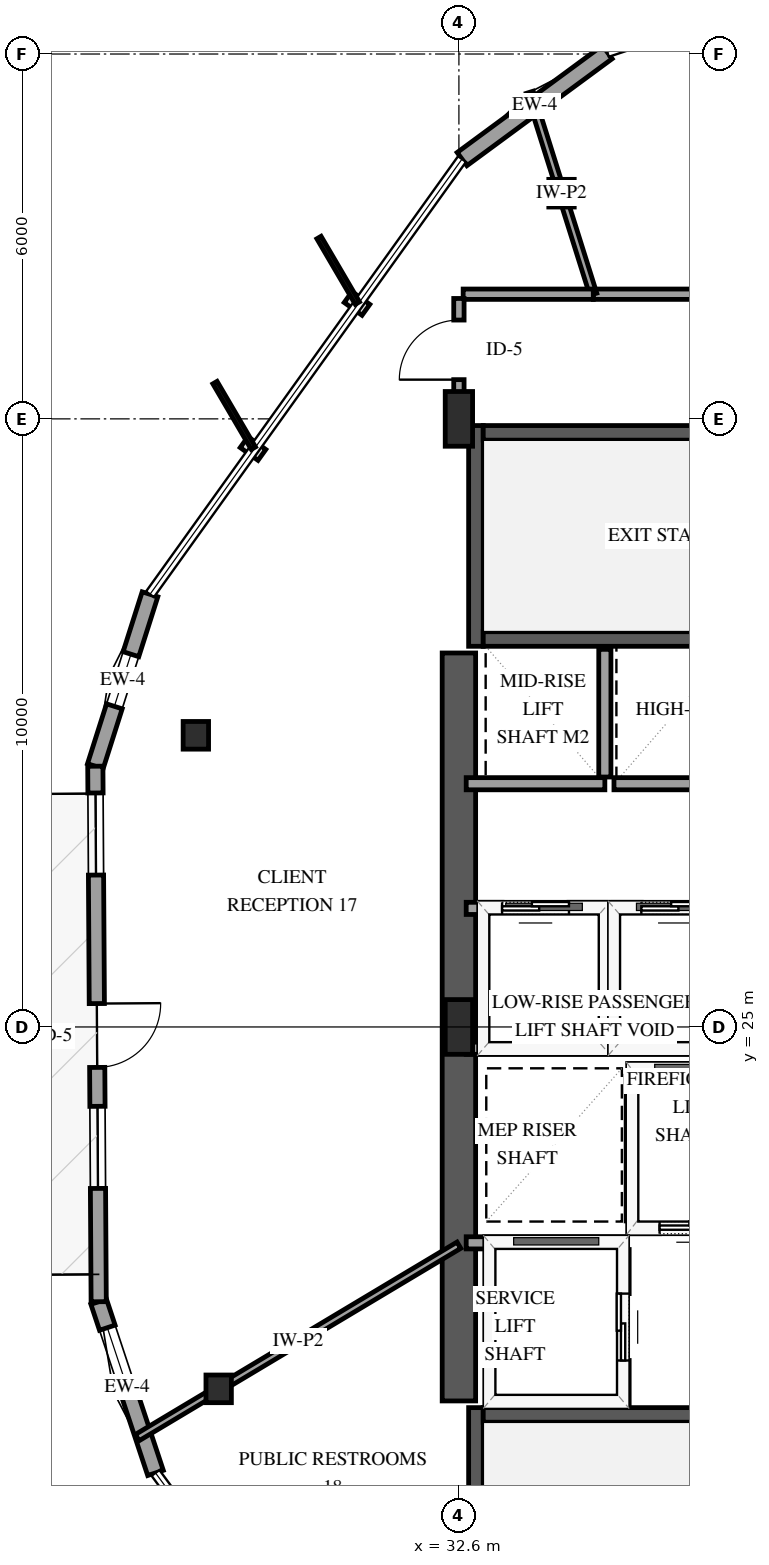
"""IFC4 building model, lengths in metres.
Left out: names, types, materials, properties, quantities, classifications, styles, units other than length and angle.
Written with IfcOpenShell. Run it as: python <this file> out.ifc"""

import sys

from ifc_helpers import new_model, si_unit, direction, frame, frame_2d, origin, origin_2d, place, context, subcontext, project, spatial, rectangle, i_section, extrude, element, fill, save


model = new_model("IFC4")
c1 = context("Model", 3, precision=1e-05, world=origin(), true_north=direction((0.0, 1.0)))
c2 = subcontext(c1, "Body", "Model", "MODEL_VIEW")
j1 = project(units=[si_unit("LENGTHUNIT", "METRE"), si_unit("PLANEANGLEUNIT", "RADIAN")], contexts=[c1])
p1 = place(None, origin())
s1 = spatial("IfcSite", under=j1, at=p1, CompositionType="ELEMENT")
p2 = place(p1, origin())
s2 = spatial("IfcBuilding", under=s1, at=p2, CompositionType="ELEMENT")
p3 = place(p2, frame((0.0, 0.0, 99.1)))
s3 = spatial("IfcBuildingStorey", under=s2, at=p3, CompositionType="ELEMENT", Elevation=99.1)
p4 = place(p3, frame((32.88, 15.11, 0.0), z_axis=(0.0, 0.0, 1.0), x_axis=(0.0, 1.0, 0.0)))
e1 = element("IfcWall", 1, at=p4, inside=s3, PredefinedType="SHEAR", context=c2, shape_type="SweptSolid", body=[
    extrude(rectangle(XDim=3.63, YDim=0.24, at=frame_2d((1.815, 0.0))), origin(), (0.0, 0.0, 1.0), 3.9),
])
p5 = place(p3, frame((33.0, 18.62, 0.0), z_axis=(0.0, 0.0, 1.0), x_axis=(1.0, 0.0, 0.0)))
e2 = element("IfcWall", 2, at=p5, inside=s3, PredefinedType="SHEAR", context=c2, shape_type="SweptSolid", body=[
    extrude(rectangle(XDim=8.0, YDim=0.24, at=frame_2d((4.0, 0.0))), origin(), (0.0, 0.0, 1.0), 3.9),
])
p6 = place(p3, frame((32.88, 31.26, 0.0), z_axis=(0.0, 0.0, 1.0), x_axis=(0.0, 1.0, 0.0)))
e3 = element("IfcWall", 3, at=p6, inside=s3, PredefinedType="SHEAR", context=c2, shape_type="SweptSolid", body=[
    extrude(rectangle(XDim=3.63, YDim=0.24, at=frame_2d((1.815, 0.0))), origin(), (0.0, 0.0, 1.0), 3.9),
])
for number, where, z_axis, x_axis in (
    (4, (33.0, 31.38, 0.0), (0.0, 0.0, 1.0), (1.0, 0.0, 0.0)),
    (5, (33.0, 34.77, 0.0), (0.0, 0.0, 1.0), (1.0, 0.0, 0.0)),
):
    element("IfcWall", number, at=place(p3, frame(where, z_axis=z_axis, x_axis=x_axis)), inside=s3, PredefinedType="SHEAR", context=c2, shape_type="SweptSolid", body=[
        extrude(rectangle(XDim=8.0, YDim=0.24, at=frame_2d((4.0, 0.0))), origin(), (0.0, 0.0, 1.0), 3.9),
    ])
p7 = place(p3, frame((32.6, 18.85, 0.0), z_axis=(0.0, 0.0, 1.0), x_axis=(0.0, 1.0, 0.0)))
e6 = element("IfcWall", 6, at=p7, inside=s3, PredefinedType="SHEAR", context=c2, shape_type="SweptSolid", body=[
    extrude(rectangle(XDim=12.3, YDim=0.55, at=frame_2d((6.15, 0.0))), origin(), (0.0, 0.0, 1.0), 3.9),
])
for number, where, z_axis, x_axis in (
    (7, (32.6, 25.0, 0.0), (0.0, 0.0, 1.0), (1.0, 0.0, 0.0)),
    (8, (32.6, 35.0, 0.0), (0.0, 0.0, 1.0), (1.0, 0.0, 0.0)),
):
    element("IfcColumn", number, at=place(p3, frame(where, z_axis=z_axis, x_axis=x_axis)), inside=s3, PredefinedType="PILASTER", context=c2, shape_type="SweptSolid", body=[
        extrude(rectangle(XDim=0.45, YDim=0.9, at=origin_2d()), origin(), (0.0, 0.0, 1.0), 3.9),
    ])
for number, where, z_axis, x_axis in (
    (9, (34.288, 38.711, 0.0), (0.0, 0.0, 1.0), (1.0, 0.0, 0.0)),
    (10, (28.274, 29.796, 0.0), (0.0, 0.0, 1.0), (1.0, 0.0, 0.0)),
    (11, (28.649, 19.049, 0.0), (0.0, 0.0, 1.0), (1.0, 0.0, 0.0)),
):
    element("IfcColumn", number, at=place(p3, frame(where, z_axis=z_axis, x_axis=x_axis)), inside=s3, PredefinedType="COLUMN", context=c2, shape_type="SweptSolid", body=[
        extrude(i_section(OverallWidth=0.418, OverallDepth=0.455, WebThickness=0.042, FlangeThickness=0.068, FilletRadius=0.038, at=origin_2d()), origin(), (0.0, 0.0, 1.0), 3.9),
    ])
p8 = place(p3, frame((35.04, 41.031, 0.0), z_axis=(0.0, 0.0, 1.0), x_axis=(-0.80529158798, -0.592878957569, 0.0)))
e12 = element("IfcWall", 12, at=p8, inside=s3, PredefinedType="SOLIDWALL", context=c2, shape_type="SweptSolid", body=[
    extrude(rectangle(XDim=2.967, YDim=0.27, at=frame_2d((1.483, 0.0))), origin(), (0.0, 0.0, 1.0), 2.979),
])
p9 = place(p3, frame((27.52, 32.115, 0.0), z_axis=(0.0, 0.0, 1.0), x_axis=(-0.303013428865, -0.952986286327, 0.0)))
e13 = element("IfcWall", 13, at=p9, inside=s3, PredefinedType="SOLIDWALL", context=c2, shape_type="SweptSolid", body=[
    extrude(rectangle(XDim=2.967, YDim=0.27, at=frame_2d((1.483, 0.0))), origin(), (0.0, 0.0, 1.0), 2.979),
])
p10 = place(p9, frame((1.033, 0.0, 0.75)))
e14 = element("IfcOpeningElement", 14, at=p10, cuts=e13, PredefinedType="OPENING", context=c2, shape_type="SweptSolid", body=[
    extrude(rectangle(XDim=0.9, YDim=1.5, at=frame_2d((0.45, 0.75))), frame((0.0, 0.145, 0.0), z_axis=(0.0, -1.0, 0.0), x_axis=(1.0, 0.0, 0.0)), (0.0, 0.0, 1.0), 0.29),
])
p11 = place(p3, frame((26.676, 20.481, 0.0), z_axis=(0.0, 0.0, 1.0), x_axis=(0.314968272773, -0.94910220058, 0.0)))
e15 = element("IfcWall", 15, at=p11, inside=s3, PredefinedType="SOLIDWALL", context=c2, shape_type="SweptSolid", body=[
    extrude(rectangle(XDim=2.966, YDim=0.27, at=frame_2d((1.483, 0.0))), origin(), (0.0, 0.0, 1.0), 2.979),
])
p12 = place(p11, frame((0.45, 0.0, 0.75)))
e16 = element("IfcOpeningElement", 16, at=p12, cuts=e15, PredefinedType="OPENING", context=c2, shape_type="SweptSolid", body=[
    extrude(rectangle(XDim=0.9, YDim=1.5, at=frame_2d((0.45, 0.75))), frame((0.0, 0.145, 0.0), z_axis=(0.0, -1.0, 0.0), x_axis=(1.0, 0.0, 0.0)), (0.0, 0.0, 1.0), 0.29),
])
p13 = place(p3, frame((26.621, 29.288, 0.0), z_axis=(0.0, 0.0, 1.0), x_axis=(0.006293019465, -0.999980198757, 0.0)))
e17 = element("IfcWall", 17, at=p13, inside=s3, PredefinedType="SOLIDWALL", context=c2, shape_type="SweptSolid", body=[
    extrude(rectangle(XDim=8.807, YDim=0.25, at=frame_2d((4.403, 0.0))), origin(), (0.0, 0.0, 1.0), 2.979),
])
p14 = place(p13, frame((3.903, 0.0, 0.0)))
e18 = element("IfcOpeningElement", 18, at=p14, cuts=e17, PredefinedType="OPENING", context=c2, shape_type="SweptSolid", body=[
    extrude(rectangle(XDim=1.05, YDim=2.15, at=frame_2d((0.525, 1.075))), frame((0.0, 0.135, 0.0), z_axis=(0.0, -1.0, 0.0), x_axis=(1.0, 0.0, 0.0)), (0.0, 0.0, 1.0), 0.27),
])
p15 = place(p13, frame((0.44, 0.0, 0.72)))
e19 = element("IfcOpeningElement", 19, at=p15, cuts=e17, PredefinedType="OPENING", context=c2, shape_type="SweptSolid", body=[
    extrude(rectangle(XDim=1.35, YDim=1.65, at=frame_2d((0.675, 0.825))), frame((0.0, 0.135, 0.0), z_axis=(0.0, -1.0, 0.0), x_axis=(1.0, 0.0, 0.0)), (0.0, 0.0, 1.0), 0.27),
])
p16 = place(p13, frame((5.593, 0.0, 0.72)))
e20 = element("IfcOpeningElement", 20, at=p16, cuts=e17, PredefinedType="OPENING", context=c2, shape_type="SweptSolid", body=[
    extrude(rectangle(XDim=1.35, YDim=1.65, at=frame_2d((0.675, 0.825))), frame((0.0, 0.135, 0.0), z_axis=(0.0, -1.0, 0.0), x_axis=(1.0, 0.0, 0.0)), (0.0, 0.0, 1.0), 0.27),
])
p17 = place(p3, frame((35.45, 21.7, 0.0), z_axis=(0.0, 0.0, 1.0), x_axis=(1.0, 0.0, 0.0)))
e21 = element("IfcWall", 21, at=p17, inside=s3, PredefinedType="SOLIDWALL", context=c2, shape_type="SweptSolid", body=[
    extrude(rectangle(XDim=2.0, YDim=0.2, at=frame_2d((1.0, 0.0))), origin(), (0.0, 0.0, 1.0), 3.6),
])
p18 = place(p17, frame((0.45, 0.0, 0.0)))
e22 = element("IfcOpeningElement", 22, at=p18, cuts=e21, PredefinedType="OPENING", context=c2, shape_type="SweptSolid", body=[
    extrude(rectangle(XDim=1.1, YDim=2.15, at=frame_2d((0.55, 1.075))), frame((0.0, 0.11, 0.0), z_axis=(0.0, -1.0, 0.0), x_axis=(1.0, 0.0, 0.0)), (0.0, 0.0, 1.0), 0.22),
])
p19 = place(p3, frame((35.45, 24.3, 0.0), z_axis=(0.0, 0.0, 1.0), x_axis=(1.0, 0.0, 0.0)))
e23 = element("IfcWall", 23, at=p19, inside=s3, PredefinedType="SOLIDWALL", context=c2, shape_type="SweptSolid", body=[
    extrude(rectangle(XDim=2.0, YDim=0.2, at=frame_2d((1.0, 0.0))), origin(), (0.0, 0.0, 1.0), 3.6),
])
p20 = place(p3, frame((35.45, 21.81, 0.0), z_axis=(0.0, 0.0, 1.0), x_axis=(0.0, 1.0, 0.0)))
e24 = element("IfcWall", 24, at=p20, inside=s3, PredefinedType="SOLIDWALL", context=c2, shape_type="SweptSolid", body=[
    extrude(rectangle(XDim=2.38, YDim=0.2, at=frame_2d((1.19, 0.0))), origin(), (0.0, 0.0, 1.0), 3.6),
])
p21 = place(p3, frame((32.72, 21.45, 0.0), z_axis=(0.0, 0.0, 1.0), x_axis=(1.0, 0.0, 0.0)))
e25 = element("IfcWall", 25, at=p21, inside=s3, PredefinedType="SOLIDWALL", context=c2, shape_type="SweptSolid", body=[
    extrude(rectangle(XDim=2.58, YDim=0.2, at=frame_2d((1.29, 0.0))), origin(), (0.0, 0.0, 1.0), 3.6),
])
p22 = place(p3, frame((35.3, 18.79, 0.0), z_axis=(0.0, 0.0, 1.0), x_axis=(0.0, 1.0, 0.0)))
e26 = element("IfcWall", 26, at=p22, inside=s3, PredefinedType="SOLIDWALL", context=c2, shape_type="SweptSolid", body=[
    extrude(rectangle(XDim=2.55, YDim=0.2, at=frame_2d((1.275, 0.0))), origin(), (0.0, 0.0, 1.0), 3.6),
])
p23 = place(p22, frame((0.725, 0.0, 0.0)))
e27 = element("IfcOpeningElement", 27, at=p23, cuts=e26, PredefinedType="OPENING", context=c2, shape_type="SweptSolid", body=[
    extrude(rectangle(XDim=1.1, YDim=2.15, at=frame_2d((0.55, 1.075))), frame((0.0, 0.11, 0.0), z_axis=(0.0, -1.0, 0.0), x_axis=(1.0, 0.0, 0.0)), (0.0, 0.0, 1.0), 0.22),
])
p24 = place(p3, frame((32.72, 24.65, 0.0), z_axis=(0.0, 0.0, 1.0), x_axis=(1.0, 0.0, 0.0)))
e28 = element("IfcWall", 28, at=p24, inside=s3, PredefinedType="SOLIDWALL", context=c2, shape_type="SweptSolid", body=[
    extrude(rectangle(XDim=2.28, YDim=0.2, at=frame_2d((1.14, 0.0))), origin(), (0.0, 0.0, 1.0), 3.6),
])
p25 = place(p3, frame((32.72, 26.95, 0.0), z_axis=(0.0, 0.0, 1.0), x_axis=(1.0, 0.0, 0.0)))
e29 = element("IfcWall", 29, at=p25, inside=s3, PredefinedType="SOLIDWALL", context=c2, shape_type="SweptSolid", body=[
    extrude(rectangle(XDim=2.28, YDim=0.2, at=frame_2d((1.14, 0.0))), origin(), (0.0, 0.0, 1.0), 3.6),
])
p26 = place(p25, frame((0.59, 0.0, 0.0)))
e30 = element("IfcOpeningElement", 30, at=p26, cuts=e29, PredefinedType="OPENING", context=c2, shape_type="SweptSolid", body=[
    extrude(rectangle(XDim=1.1, YDim=2.15, at=frame_2d((0.55, 1.075))), frame((0.0, 0.11, 0.0), z_axis=(0.0, -1.0, 0.0), x_axis=(1.0, 0.0, 0.0)), (0.0, 0.0, 1.0), 0.22),
])
p27 = place(p3, frame((35.0, 24.76, 0.0), z_axis=(0.0, 0.0, 1.0), x_axis=(0.0, 1.0, 0.0)))
e31 = element("IfcWall", 31, at=p27, inside=s3, PredefinedType="SOLIDWALL", context=c2, shape_type="SweptSolid", body=[
    extrude(rectangle(XDim=2.08, YDim=0.2, at=frame_2d((1.04, 0.0))), origin(), (0.0, 0.0, 1.0), 3.6),
])
p28 = place(p3, frame((35.15, 24.65, 0.0), z_axis=(0.0, 0.0, 1.0), x_axis=(1.0, 0.0, 0.0)))
e32 = element("IfcWall", 32, at=p28, inside=s3, PredefinedType="SOLIDWALL", context=c2, shape_type="SweptSolid", body=[
    extrude(rectangle(XDim=2.0, YDim=0.2, at=frame_2d((1.0, 0.0))), origin(), (0.0, 0.0, 1.0), 3.6),
])
p29 = place(p3, frame((35.15, 26.95, 0.0), z_axis=(0.0, 0.0, 1.0), x_axis=(1.0, 0.0, 0.0)))
e33 = element("IfcWall", 33, at=p29, inside=s3, PredefinedType="SOLIDWALL", context=c2, shape_type="SweptSolid", body=[
    extrude(rectangle(XDim=2.0, YDim=0.2, at=frame_2d((1.0, 0.0))), origin(), (0.0, 0.0, 1.0), 3.6),
])
p30 = place(p29, frame((0.45, 0.0, 0.0)))
e34 = element("IfcOpeningElement", 34, at=p30, cuts=e33, PredefinedType="OPENING", context=c2, shape_type="SweptSolid", body=[
    extrude(rectangle(XDim=1.1, YDim=2.15, at=frame_2d((0.55, 1.075))), frame((0.0, 0.11, 0.0), z_axis=(0.0, -1.0, 0.0), x_axis=(1.0, 0.0, 0.0)), (0.0, 0.0, 1.0), 0.22),
])
p31 = place(p3, frame((32.72, 29.0, 0.0), z_axis=(0.0, 0.0, 1.0), x_axis=(1.0, 0.0, 0.0)))
e35 = element("IfcWall", 35, at=p31, inside=s3, PredefinedType="SOLIDWALL", context=c2, shape_type="SweptSolid", body=[
    extrude(rectangle(XDim=2.28, YDim=0.2, at=frame_2d((1.14, 0.0))), origin(), (0.0, 0.0, 1.0), 3.6),
])
p32 = place(p3, frame((35.0, 29.11, 0.0), z_axis=(0.0, 0.0, 1.0), x_axis=(0.0, 1.0, 0.0)))
e36 = element("IfcWall", 36, at=p32, inside=s3, PredefinedType="SOLIDWALL", context=c2, shape_type="SweptSolid", body=[
    extrude(rectangle(XDim=2.1, YDim=0.2, at=frame_2d((1.05, 0.0))), origin(), (0.0, 0.0, 1.0), 3.6),
])
p33 = place(p3, frame((35.15, 29.0, 0.0), z_axis=(0.0, 0.0, 1.0), x_axis=(1.0, 0.0, 0.0)))
e37 = element("IfcWall", 37, at=p33, inside=s3, PredefinedType="SOLIDWALL", context=c2, shape_type="SweptSolid", body=[
    extrude(rectangle(XDim=2.0, YDim=0.2, at=frame_2d((1.0, 0.0))), origin(), (0.0, 0.0, 1.0), 3.6),
])
p34 = place(p3, frame((34.81, 37.05, 0.0), z_axis=(0.0, 0.0, 1.0), x_axis=(1.0, 0.0, 0.0)))
e38 = element("IfcWall", 38, at=p34, inside=s3, PredefinedType="PARTITIONING", context=c2, shape_type="SweptSolid", body=[
    extrude(rectangle(XDim=7.804, YDim=0.17, at=frame_2d((3.902, 0.0))), origin(), (0.0, 0.0, 1.0), 3.6),
])
p35 = place(p34, frame((3.427, 0.0, 0.0)))
e39 = element("IfcOpeningElement", 39, at=p35, cuts=e38, PredefinedType="OPENING", context=c2, shape_type="SweptSolid", body=[
    extrude(rectangle(XDim=0.98, YDim=2.15, at=frame_2d((0.49, 1.075))), frame((0.0, 0.095, 0.0), z_axis=(0.0, -1.0, 0.0), x_axis=(1.0, 0.0, 0.0)), (0.0, 0.0, 1.0), 0.19),
])
p36 = place(p3, frame((32.6, 21.411, 0.0), z_axis=(0.0, 0.0, 1.0), x_axis=(-0.858222476584, -0.513277878625, 0.0)))
e40 = element("IfcWall", 40, at=p36, inside=s3, PredefinedType="PARTITIONING", context=c2, shape_type="SweptSolid", body=[
    extrude(rectangle(XDim=6.164, YDim=0.12, at=frame_2d((3.082, 0.0))), origin(), (0.0, 0.0, 1.0), 3.6),
])
p37 = place(p3, frame((34.81, 37.05, 0.0), z_axis=(0.0, 0.0, 1.0), x_axis=(-0.300194900444, 0.953877886182, 0.0)))
e41 = element("IfcWall", 41, at=p37, inside=s3, PredefinedType="PARTITIONING", context=c2, shape_type="SweptSolid", body=[
    extrude(rectangle(XDim=3.482, YDim=0.12, at=frame_2d((1.741, 0.0))), origin(), (0.0, 0.0, 1.0), 2.895),
])
p38 = place(p3, frame((32.67, 37.05, 0.0), z_axis=(0.0, 0.0, 1.0), x_axis=(1.0, 0.0, 0.0)))
e42 = element("IfcWall", 42, at=p38, inside=s3, PredefinedType="PARTITIONING", context=c2, shape_type="SweptSolid", body=[
    extrude(rectangle(XDim=2.14, YDim=0.17, at=frame_2d((1.07, 0.0))), origin(), (0.0, 0.0, 1.0), 3.6),
])
p39 = place(p3, frame((32.6, 35.07, 0.0), z_axis=(0.0, 0.0, 1.0), x_axis=(0.0, 1.0, 0.0)))
e43 = element("IfcWall", 43, at=p39, inside=s3, PredefinedType="PARTITIONING", context=c2, shape_type="SweptSolid", body=[
    extrude(rectangle(XDim=1.91, YDim=0.17, at=frame_2d((0.955, 0.0))), origin(), (0.0, 0.0, 1.0), 3.6),
])
p40 = place(p39, frame((0.575, 0.0, 0.0)))
e44 = element("IfcOpeningElement", 44, at=p40, cuts=e43, PredefinedType="OPENING", context=c2, shape_type="SweptSolid", body=[
    extrude(rectangle(XDim=0.98, YDim=2.15, at=frame_2d((0.49, 1.075))), frame((0.0, 0.095, 0.0), z_axis=(0.0, -1.0, 0.0), x_axis=(1.0, 0.0, 0.0)), (0.0, 0.0, 1.0), 0.19),
])
p41 = place(p10, origin())
e45 = element("IfcWindow", 45, at=p41, inside=s3, PartitioningType="SINGLE_PANEL", PredefinedType="WINDOW", context=c2, shape_type="SweptSolid", body=[
    extrude(rectangle(XDim=0.9, YDim=1.5, at=frame_2d((0.45, 0.75))), frame((0.0, 0.03, 0.0), z_axis=(0.0, -1.0, 0.0), x_axis=(1.0, 0.0, 0.0)), (0.0, 0.0, 1.0), 0.06),
])
fill(e14, e45)
p42 = place(p12, origin())
e46 = element("IfcWindow", 46, at=p42, inside=s3, PartitioningType="SINGLE_PANEL", PredefinedType="WINDOW", context=c2, shape_type="SweptSolid", body=[
    extrude(rectangle(XDim=0.9, YDim=1.5, at=frame_2d((0.45, 0.75))), frame((0.0, 0.03, 0.0), z_axis=(0.0, -1.0, 0.0), x_axis=(1.0, 0.0, 0.0)), (0.0, 0.0, 1.0), 0.06),
])
fill(e16, e46)
p43 = place(p14, origin())
e47 = element("IfcDoor", 47, at=p43, inside=s3, OperationType="SINGLE_SWING_LEFT", PredefinedType="DOOR", context=c2, shape_type="SweptSolid", body=[
    extrude(rectangle(XDim=1.05, YDim=2.15, at=frame_2d((0.525, 1.075))), frame((0.0, 0.025, 0.0), z_axis=(0.0, -1.0, 0.0), x_axis=(1.0, 0.0, 0.0)), (0.0, 0.0, 1.0), 0.05),
])
fill(e18, e47)
p44 = place(p15, origin())
e48 = element("IfcWindow", 48, at=p44, inside=s3, PartitioningType="SINGLE_PANEL", PredefinedType="WINDOW", context=c2, shape_type="SweptSolid", body=[
    extrude(rectangle(XDim=1.35, YDim=1.65, at=frame_2d((0.675, 0.825))), frame((0.0, 0.03, 0.0), z_axis=(0.0, -1.0, 0.0), x_axis=(1.0, 0.0, 0.0)), (0.0, 0.0, 1.0), 0.06),
])
fill(e19, e48)
p45 = place(p16, origin())
e49 = element("IfcWindow", 49, at=p45, inside=s3, PartitioningType="SINGLE_PANEL", PredefinedType="WINDOW", context=c2, shape_type="SweptSolid", body=[
    extrude(rectangle(XDim=1.35, YDim=1.65, at=frame_2d((0.675, 0.825))), frame((0.0, 0.03, 0.0), z_axis=(0.0, -1.0, 0.0), x_axis=(1.0, 0.0, 0.0)), (0.0, 0.0, 1.0), 0.06),
])
fill(e20, e49)
p46 = place(p18, origin())
e50 = element("IfcDoor", 50, at=p46, inside=s3, OperationType="SLIDING_TO_LEFT", PredefinedType="DOOR", context=c2, shape_type="SweptSolid", body=[
    extrude(rectangle(XDim=1.1, YDim=2.15, at=frame_2d((0.55, 1.075))), frame((0.0, 0.025, 0.0), z_axis=(0.0, -1.0, 0.0), x_axis=(1.0, 0.0, 0.0)), (0.0, 0.0, 1.0), 0.05),
])
fill(e22, e50)
p47 = place(p23, origin())
e51 = element("IfcDoor", 51, at=p47, inside=s3, OperationType="SLIDING_TO_LEFT", PredefinedType="DOOR", context=c2, shape_type="SweptSolid", body=[
    extrude(rectangle(XDim=1.1, YDim=2.15, at=frame_2d((0.55, 1.075))), frame((0.0, 0.025, 0.0), z_axis=(0.0, -1.0, 0.0), x_axis=(1.0, 0.0, 0.0)), (0.0, 0.0, 1.0), 0.05),
])
fill(e27, e51)
p48 = place(p26, origin())
e52 = element("IfcDoor", 52, at=p48, inside=s3, OperationType="SLIDING_TO_LEFT", PredefinedType="DOOR", context=c2, shape_type="SweptSolid", body=[
    extrude(rectangle(XDim=1.1, YDim=2.15, at=frame_2d((0.55, 1.075))), frame((0.0, 0.025, 0.0), z_axis=(0.0, -1.0, 0.0), x_axis=(1.0, 0.0, 0.0)), (0.0, 0.0, 1.0), 0.05),
])
fill(e30, e52)
p49 = place(p30, origin())
e53 = element("IfcDoor", 53, at=p49, inside=s3, OperationType="SLIDING_TO_LEFT", PredefinedType="DOOR", context=c2, shape_type="SweptSolid", body=[
    extrude(rectangle(XDim=1.1, YDim=2.15, at=frame_2d((0.55, 1.075))), frame((0.0, 0.025, 0.0), z_axis=(0.0, -1.0, 0.0), x_axis=(1.0, 0.0, 0.0)), (0.0, 0.0, 1.0), 0.05),
])
fill(e34, e53)
p50 = place(p40, origin())
e54 = element("IfcDoor", 54, at=p50, inside=s3, OperationType="SINGLE_SWING_LEFT", PredefinedType="DOOR", context=c2, shape_type="SweptSolid", body=[
    extrude(rectangle(XDim=0.98, YDim=2.15, at=frame_2d((0.49, 1.075))), frame((0.0, 0.025, 0.0), z_axis=(0.0, -1.0, 0.0), x_axis=(1.0, 0.0, 0.0)), (0.0, 0.0, 1.0), 0.05),
])
fill(e44, e54)
save(model, sys.argv[1])
